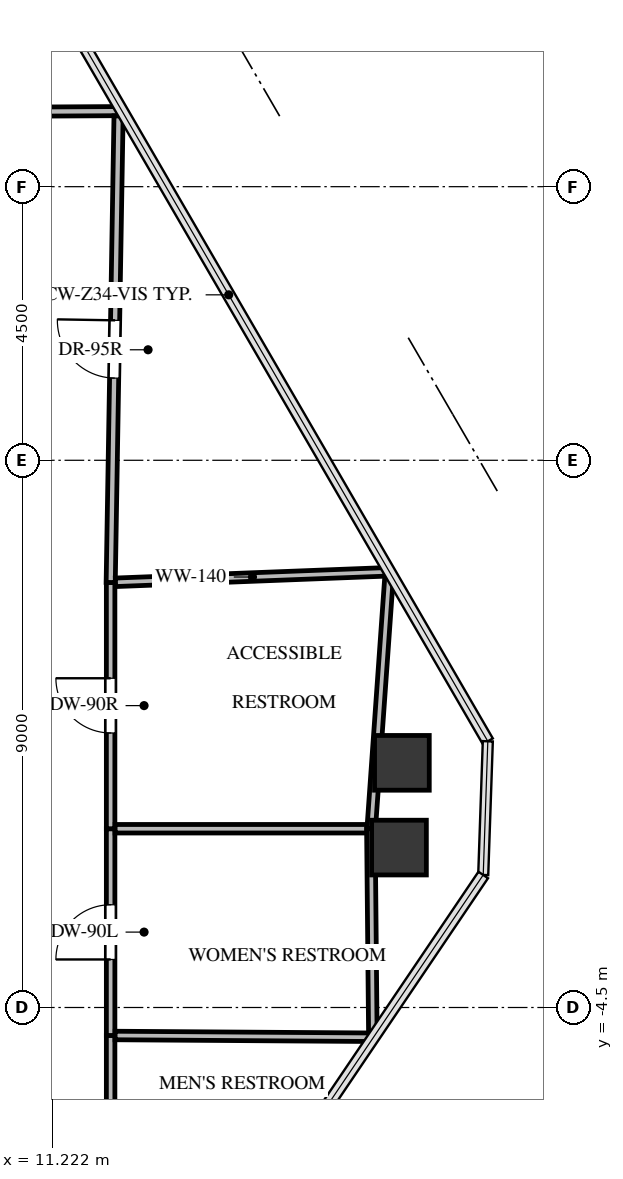
"""IFC4 building model, lengths in metres.
Left out: names, types, materials, properties, quantities, classifications, styles, units other than length and angle.
Written with IfcOpenShell. Run it as: python <this file> out.ifc"""

import sys

from ifc_helpers import new_model, si_unit, direction, frame, frame_2d, origin, origin_2d, place, context, subcontext, project, spatial, rectangle, extrude, source, transform, mapped, element, fill, save


model = new_model("IFC4")
c1 = context("Model", 3, precision=1e-05, world=origin(), true_north=direction((0.0, 1.0)))
c2 = subcontext(c1, "Body", "Model", "MODEL_VIEW")
j1 = project(units=[si_unit("LENGTHUNIT", "METRE"), si_unit("PLANEANGLEUNIT", "RADIAN")], contexts=[c1])
p1 = place(None, origin())
s1 = spatial("IfcSite", under=j1, at=p1, CompositionType="ELEMENT")
p2 = place(p1, origin())
s2 = spatial("IfcBuilding", under=s1, at=p2, CompositionType="ELEMENT")
p3 = place(p2, frame((0.0, 0.0, 224.9)))
s3 = spatial("IfcBuildingStorey", under=s2, at=p3, CompositionType="ELEMENT", Elevation=224.9)
m1 = source(origin(), c2, "Body", "SweptSolid", [
    extrude(rectangle(XDim=0.9, YDim=0.9, at=origin_2d()), origin(), (0.0, 0.0, 1.0), 3.3),
])
for number, where, z_axis, x_axis in (
    (1, (16.97, -0.476, -0.24), (0.0, 0.0, 1.0), (1.0, 0.0, 0.0)),
    (2, (16.922, -1.87, -0.24), (0.0, 0.0, 1.0), (1.0, 0.0, 0.0)),
):
    element("IfcColumn", number, at=place(p3, frame(where, z_axis=z_axis, x_axis=x_axis)), inside=s3, PredefinedType="COLUMN", context=c2, shape_type="MappedRepresentation", body=[
        mapped(m1, transform((0.0, 0.0, 0.0), x_axis=(1.0, 0.0, 0.0), y_axis=(0.0, 1.0, 0.0), z_axis=(0.0, 0.0, 1.0), scale=1.0)),
    ])
p4 = place(p3, frame((12.18, -8.44, 0.0), z_axis=(0.0, 0.0, 1.0), x_axis=(0.0, 1.0, 0.0)))
e3 = element("IfcWall", 3, at=p4, inside=s3, PredefinedType="PARTITIONING", context=c2, shape_type="SweptSolid", body=[
    extrude(rectangle(XDim=3.48, YDim=0.14, at=frame_2d((1.74, 0.0))), origin(), (0.0, 0.0, 1.0), 2.399),
])
p5 = place(p4, frame((1.29, 0.0, 0.0)))
e4 = element("IfcOpeningElement", 4, at=p5, cuts=e3, PredefinedType="OPENING", context=c2, shape_type="SweptSolid", body=[
    extrude(rectangle(XDim=0.9, YDim=2.05, at=frame_2d((0.45, 1.025))), frame((0.0, 0.08, 0.0), z_axis=(0.0, -1.0, 0.0), x_axis=(1.0, 0.0, 0.0)), (0.0, 0.0, 1.0), 0.16),
])
p6 = place(p3, frame((12.18, -4.96, 0.0), z_axis=(0.0, 0.0, 1.0), x_axis=(0.0, 1.0, 0.0)))
e5 = element("IfcWall", 5, at=p6, inside=s3, PredefinedType="PARTITIONING", context=c2, shape_type="SweptSolid", body=[
    extrude(rectangle(XDim=3.4, YDim=0.14, at=frame_2d((1.7, 0.0))), origin(), (0.0, 0.0, 1.0), 3.045),
])
p7 = place(p6, frame((1.25, 0.0, 0.0)))
e6 = element("IfcOpeningElement", 6, at=p7, cuts=e5, PredefinedType="OPENING", context=c2, shape_type="SweptSolid", body=[
    extrude(rectangle(XDim=0.9, YDim=2.05, at=frame_2d((0.45, 1.025))), frame((0.0, 0.08, 0.0), z_axis=(0.0, -1.0, 0.0), x_axis=(1.0, 0.0, 0.0)), (0.0, 0.0, 1.0), 0.16),
])
p8 = place(p3, frame((12.18, -1.56, 0.0), z_axis=(0.0, 0.0, 1.0), x_axis=(0.0, 1.0, 0.0)))
e7 = element("IfcWall", 7, at=p8, inside=s3, PredefinedType="PARTITIONING", context=c2, shape_type="SweptSolid", body=[
    extrude(rectangle(XDim=4.05, YDim=0.14, at=frame_2d((2.025, 0.0))), origin(), (0.0, 0.0, 1.0), 2.302),
])
p9 = place(p8, frame((1.575, 0.0, 0.0)))
e8 = element("IfcOpeningElement", 8, at=p9, cuts=e7, PredefinedType="OPENING", context=c2, shape_type="SweptSolid", body=[
    extrude(rectangle(XDim=0.9, YDim=2.05, at=frame_2d((0.45, 1.025))), frame((0.0, 0.08, 0.0), z_axis=(0.0, -1.0, 0.0), x_axis=(1.0, 0.0, 0.0)), (0.0, 0.0, 1.0), 0.16),
])
p10 = place(p3, frame((12.368, 10.243, 0.0), z_axis=(0.0, 0.0, 1.0), x_axis=(-0.999984623931, -0.005545439622, 0.0)))
e9 = element("IfcWall", 9, at=p10, inside=s3, PredefinedType="PARTITIONING", context=c2, shape_type="SweptSolid", body=[
    extrude(rectangle(XDim=11.359, YDim=0.15, at=frame_2d((5.679, 0.0))), origin(), (0.0, 0.0, 1.0), 2.302),
])
p11 = place(p10, frame((5.204, 0.0, 0.0)))
e10 = element("IfcOpeningElement", 10, at=p11, cuts=e9, PredefinedType="OPENING", context=c2, shape_type="SweptSolid", body=[
    extrude(rectangle(XDim=0.95, YDim=2.1, at=frame_2d((0.475, 1.05))), frame((0.0, 0.085, 0.0), z_axis=(0.0, -1.0, 0.0), x_axis=(1.0, 0.0, 0.0)), (0.0, 0.0, 1.0), 0.17),
])
p12 = place(p3, frame((12.181, 2.49, 0.0), z_axis=(0.0, 0.0, 1.0), x_axis=(0.016828134389, 0.999858396921, 0.0)))
e11 = element("IfcWall", 11, at=p12, inside=s3, PredefinedType="PARTITIONING", context=c2, shape_type="SweptSolid", body=[
    extrude(rectangle(XDim=7.675, YDim=0.15, at=frame_2d((3.837, 0.0))), origin(), (0.0, 0.0, 1.0), 2.399),
])
p13 = place(p12, frame((3.362, 0.0, 0.0)))
e12 = element("IfcOpeningElement", 12, at=p13, cuts=e11, PredefinedType="OPENING", context=c2, shape_type="SweptSolid", body=[
    extrude(rectangle(XDim=0.95, YDim=2.1, at=frame_2d((0.475, 1.05))), frame((0.0, 0.085, 0.0), z_axis=(0.0, -1.0, 0.0), x_axis=(1.0, 0.0, 0.0)), (0.0, 0.0, 1.0), 0.17),
])
p14 = place(p3, frame((12.254, -4.96, 0.0), z_axis=(0.0, 0.0, 1.0), x_axis=(0.999976630429, -0.006836563198, 0.0)))
e13 = element("IfcWall", 13, at=p14, inside=s3, PredefinedType="PARTITIONING", context=c2, shape_type="SweptSolid", body=[
    extrude(rectangle(XDim=4.25, YDim=0.14, at=frame_2d((2.125, 0.0))), origin(), (0.0, 0.0, 1.0), 2.399),
])
p15 = place(p3, frame((12.254, -1.56, 0.0), z_axis=(0.0, 0.0, 1.0), x_axis=(1.0, 0.0, 0.0)))
e14 = element("IfcWall", 14, at=p15, inside=s3, PredefinedType="PARTITIONING", context=c2, shape_type="SweptSolid", body=[
    extrude(rectangle(XDim=4.206, YDim=0.14, at=frame_2d((2.103, 0.0))), origin(), (0.0, 0.0, 1.0), 2.302),
])
p16 = place(p3, frame((16.46, -1.56, 0.0), z_axis=(0.0, 0.0, 1.0), x_axis=(0.009604446748, -0.999953876238, 0.0)))
e15 = element("IfcWall", 15, at=p16, inside=s3, PredefinedType="PARTITIONING", context=c2, shape_type="SweptSolid", body=[
    extrude(rectangle(XDim=3.355, YDim=0.14, at=frame_2d((1.678, 0.0))), origin(), (0.0, 0.0, 1.0), 2.302),
])
p17 = place(p3, frame((12.26, 2.493, 0.0), z_axis=(0.0, 0.0, 1.0), x_axis=(0.999256206289, 0.038562082324, 0.0)))
e16 = element("IfcWall", 16, at=p17, inside=s3, PredefinedType="PARTITIONING", context=c2, shape_type="SweptSolid", body=[
    extrude(rectangle(XDim=4.508, YDim=0.14, at=frame_2d((2.254, 0.0))), origin(), (0.0, 0.0, 1.0), 2.399),
])
p18 = place(p3, frame((16.76, 2.593, 0.0), z_axis=(0.0, 0.0, 1.0), x_axis=(-0.07055102187, -0.997508172053, 0.0)))
e17 = element("IfcWall", 17, at=p18, inside=s3, PredefinedType="PARTITIONING", context=c2, shape_type="SweptSolid", body=[
    extrude(rectangle(XDim=4.163, YDim=0.14, at=frame_2d((2.082, 0.0))), origin(), (0.0, 0.0, 1.0), 2.302),
])
m2 = source(origin(), c2, "Body", "SweptSolid", [
    extrude(rectangle(XDim=0.9, YDim=2.05, at=frame_2d((0.45, 1.025))), frame((0.0, 0.025, 0.0), z_axis=(0.0, -1.0, 0.0), x_axis=(1.0, 0.0, 0.0)), (0.0, 0.0, 1.0), 0.05),
])
p19 = place(p7, origin())
e18 = element("IfcDoor", 18, at=p19, inside=s3, OperationType="SINGLE_SWING_LEFT", PredefinedType="DOOR", context=c2, shape_type="MappedRepresentation", body=[
    mapped(m2, transform((0.0, 0.0, 0.0), x_axis=(1.0, 0.0, 0.0), y_axis=(0.0, 1.0, 0.0), z_axis=(0.0, 0.0, 1.0), scale=1.0)),
])
fill(e6, e18)
m3 = source(origin(), c2, "Body", "SweptSolid", [
    extrude(rectangle(XDim=0.9, YDim=2.05, at=frame_2d((0.45, 1.025))), frame((0.0, 0.025, 0.0), z_axis=(0.0, -1.0, 0.0), x_axis=(1.0, 0.0, 0.0)), (0.0, 0.0, 1.0), 0.05),
])
p20 = place(p9, origin())
e19 = element("IfcDoor", 19, at=p20, inside=s3, OperationType="SINGLE_SWING_RIGHT", PredefinedType="DOOR", context=c2, shape_type="MappedRepresentation", body=[
    mapped(m3, transform((0.0, 0.0, 0.0), x_axis=(1.0, 0.0, 0.0), y_axis=(0.0, 1.0, 0.0), z_axis=(0.0, 0.0, 1.0), scale=1.0)),
])
fill(e8, e19)
m4 = source(origin(), c2, "Body", "SweptSolid", [
    extrude(rectangle(XDim=0.95, YDim=2.1, at=frame_2d((0.475, 1.05))), frame((0.0, 0.025, 0.0), z_axis=(0.0, -1.0, 0.0), x_axis=(1.0, 0.0, 0.0)), (0.0, 0.0, 1.0), 0.05),
])
p21 = place(p13, origin())
e20 = element("IfcDoor", 20, at=p21, inside=s3, OperationType="SINGLE_SWING_RIGHT", PredefinedType="DOOR", context=c2, shape_type="MappedRepresentation", body=[
    mapped(m4, transform((0.0, 0.0, 0.0), x_axis=(1.0, 0.0, 0.0), y_axis=(0.0, 1.0, 0.0), z_axis=(0.0, 0.0, 1.0), scale=1.0)),
])
fill(e12, e20)
save(model, sys.argv[1])
